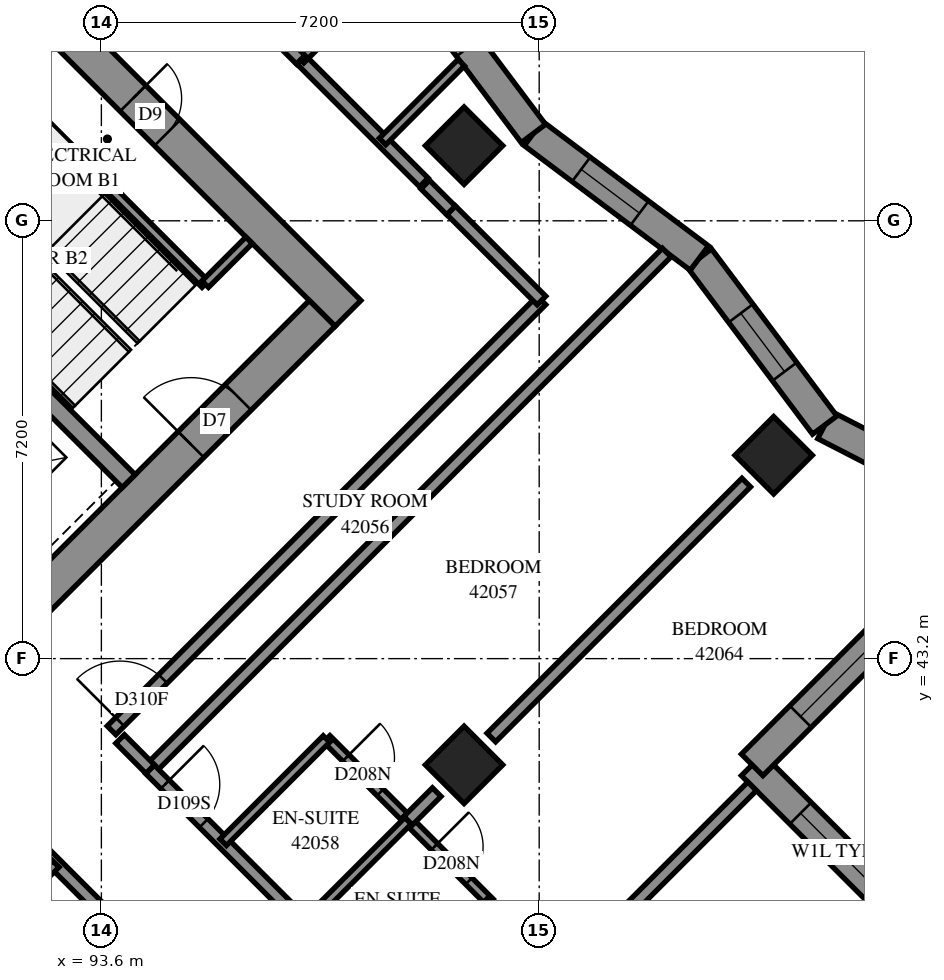
"""IFC4 building model, lengths in metres.
Left out: names, types, materials, properties, quantities, classifications, styles, units other than length and angle.
Written with IfcOpenShell. Run it as: python <this file> out.ifc"""

import sys

from ifc_helpers import new_model, si_unit, direction, frame, frame_2d, origin, origin_2d, place, context, subcontext, project, spatial, polyline, rectangle, outline, extrude, element, fill, save


model = new_model("IFC4")
c1 = context("Model", 3, precision=1e-05, world=origin(), true_north=direction((0.0, 1.0)))
c2 = subcontext(c1, "Body", "Model", "MODEL_VIEW")
j1 = project(units=[si_unit("LENGTHUNIT", "METRE"), si_unit("PLANEANGLEUNIT", "RADIAN")], contexts=[c1])
p1 = place(None, origin())
s1 = spatial("IfcSite", under=j1, at=p1, CompositionType="ELEMENT")
p2 = place(p1, origin())
s2 = spatial("IfcBuilding", under=s1, at=p2, CompositionType="ELEMENT")
p3 = place(p2, frame((0.0, 0.0, 155.8)))
s3 = spatial("IfcBuildingStorey", under=s2, at=p3, CompositionType="ELEMENT", Elevation=155.8)
for number, where, z_axis, x_axis in (
    (1, (99.565, 51.635, 0.0), (0.0, 0.0, 1.0), (0.707, -0.707, 0.0)),
    (2, (104.656, 46.544, 0.0), (0.0, 0.0, 1.0), (0.707, -0.707, 0.0)),
    (3, (99.565, 41.453, 0.0), (0.0, 0.0, 1.0), (0.707, -0.707, 0.0)),
):
    element("IfcColumn", number, at=place(p3, frame(where, z_axis=z_axis, x_axis=x_axis)), inside=s3, PredefinedType="COLUMN", context=c2, shape_type="SweptSolid", body=[
        extrude(rectangle(XDim=0.9, YDim=0.9, at=origin_2d()), origin(), (0.0, 0.0, 1.0), 3.1),
    ])
p4 = place(p3, frame((86.625, 59.908, -0.3), z_axis=(0.0, 0.0, 1.0), x_axis=(0.7071067812, -0.7071067812, 0.0)))
e4 = element("IfcWall", 4, at=p4, inside=s3, PredefinedType="SHEAR", context=c2, shape_type="SweptSolid", body=[
    extrude(rectangle(XDim=15.6, YDim=0.6, at=frame_2d((7.8, 0.0))), origin(), (0.0, 0.0, 1.0), 2.7),
])
p5 = place(p4, frame((10.6, 0.0, 0.3)))
e5 = element("IfcOpeningElement", 5, at=p5, cuts=e4, PredefinedType="OPENING", context=c2, shape_type="SweptSolid", body=[
    extrude(rectangle(XDim=0.8, YDim=2.1, at=frame_2d((0.4, 1.05))), frame((0.0, 0.31, 0.0), z_axis=(0.0, -1.0, 0.0), x_axis=(1.0, 0.0, 0.0)), (0.0, 0.0, 1.0), 0.62),
])
p6 = place(p3, frame((87.049, 38.695, -0.3), z_axis=(0.0, 0.0, 1.0), x_axis=(0.7071067812, 0.7071067812, 0.0)))
e6 = element("IfcWall", 6, at=p6, inside=s3, PredefinedType="SHEAR", context=c2, shape_type="SweptSolid", body=[
    extrude(rectangle(XDim=14.4, YDim=0.6, at=frame_2d((7.2, 0.0))), origin(), (0.0, 0.0, 1.0), 2.7),
])
p7 = place(p6, frame((4.55, 0.0, 0.3)))
e7 = element("IfcOpeningElement", 7, at=p7, cuts=e6, PredefinedType="OPENING", context=c2, shape_type="SweptSolid", body=[
    extrude(rectangle(XDim=1.1, YDim=2.1, at=frame_2d((0.55, 1.05))), frame((0.0, 0.31, 0.0), z_axis=(0.0, -1.0, 0.0), x_axis=(1.0, 0.0, 0.0)), (0.0, 0.0, 1.0), 0.62),
])
p8 = place(p6, frame((11.35, 0.0, 0.3)))
e8 = element("IfcOpeningElement", 8, at=p8, cuts=e6, PredefinedType="OPENING", context=c2, shape_type="SweptSolid", body=[
    extrude(rectangle(XDim=1.1, YDim=2.1, at=frame_2d((0.55, 1.05))), frame((0.0, 0.31, 0.0), z_axis=(0.0, -1.0, 0.0), x_axis=(1.0, 0.0, 0.0)), (0.0, 0.0, 1.0), 0.62),
])
p9 = place(p3, frame((88.958, 51.211, 0.0), z_axis=(0.0, 0.0, 1.0), x_axis=(0.7070998367, -0.7071137256, 0.0)))
e9 = element("IfcWall", 9, at=p9, inside=s3, PredefinedType="SOLIDWALL", context=c2, shape_type="SweptSolid", body=[
    extrude(rectangle(XDim=7.2, YDim=0.3, at=frame_2d((3.6, 0.0))), origin(), (0.0, 0.0, 1.0), 3.1),
])
p10 = place(p3, frame((107.761, 37.994, 0.0), z_axis=(0.0, 0.0, 1.0), x_axis=(-0.7071170022, 0.70709656, 0.0)))
e10 = element("IfcWall", 10, at=p10, inside=s3, PredefinedType="SOLIDWALL", context=c2, shape_type="SweptSolid", body=[
    extrude(outline(polyline([(-0.158, -0.25), (4.642, -0.25), (5.142, 0.25), (0.158, 0.25), (-0.158, -0.25)])), origin(), (0.0, 0.0, 1.0), 3.1),
])
p11 = place(p10, frame((1.967, 0.0, 0.6)))
e11 = element("IfcOpeningElement", 11, at=p11, cuts=e10, PredefinedType="OPENING", context=c2, shape_type="SweptSolid", body=[
    extrude(rectangle(XDim=1.8, YDim=1.9, at=frame_2d((0.9, 0.95))), frame((0.0, 0.26, 0.0), z_axis=(0.0, -1.0, 0.0), x_axis=(1.0, 0.0, 0.0)), (0.0, 0.0, 1.0), 0.52),
])
p12 = place(p3, frame((104.302, 41.453, 0.0), z_axis=(0.0, 0.0, 1.0), x_axis=(0.7071240536, 0.7070895083, 0.0)))
e12 = element("IfcWall", 12, at=p12, inside=s3, PredefinedType="SOLIDWALL", context=c2, shape_type="SweptSolid", body=[
    extrude(outline(polyline([(0.25, -0.25), (6.132, -0.25), (5.447, 0.25), (-0.25, 0.25), (0.25, -0.25)])), origin(), (0.0, 0.0, 1.0), 3.1),
])
p13 = place(p12, frame((1.125, 0.0, 0.6)))
e13 = element("IfcOpeningElement", 13, at=p13, cuts=e12, PredefinedType="OPENING", context=c2, shape_type="SweptSolid", body=[
    extrude(rectangle(XDim=1.8, YDim=1.9, at=frame_2d((0.9, 0.95))), frame((0.0, 0.26, 0.0), z_axis=(0.0, -1.0, 0.0), x_axis=(1.0, 0.0, 0.0)), (0.0, 0.0, 1.0), 0.52),
])
p14 = place(p3, frame((108.396, 45.547, 0.0), z_axis=(0.0, 0.0, 1.0), x_axis=(-0.8890618858, 0.4577870282, 0.0)))
e14 = element("IfcWall", 14, at=p14, inside=s3, PredefinedType="SOLIDWALL", context=c2, shape_type="SweptSolid", body=[
    extrude(outline(polyline([(-0.343, -0.25), (3.205, -0.25), (3.32, 0.25), (0.343, 0.25), (-0.343, -0.25)])), origin(), (0.0, 0.0, 1.0), 3.1),
])
p15 = place(p14, frame((1.203, 0.0, 0.45)))
e15 = element("IfcOpeningElement", 15, at=p15, cuts=e14, PredefinedType="OPENING", context=c2, shape_type="SweptSolid", body=[
    extrude(rectangle(XDim=1.2, YDim=2.5, at=frame_2d((0.6, 1.25))), frame((0.0, 0.26, 0.0), z_axis=(0.0, -1.0, 0.0), x_axis=(1.0, 0.0, 0.0)), (0.0, 0.0, 1.0), 0.52),
])
p16 = place(p3, frame((105.495, 47.04, 0.0), z_axis=(0.0, 0.0, 1.0), x_axis=(-0.600158369, 0.7998811987, 0.0)))
e16 = element("IfcWall", 16, at=p16, inside=s3, PredefinedType="SOLIDWALL", context=c2, shape_type="SweptSolid", body=[
    extrude(outline(polyline([(0.057, -0.25), (3.47, -0.25), (3.399, 0.25), (-0.057, 0.25), (0.057, -0.25)])), origin(), (0.0, 0.0, 1.0), 3.1),
])
p17 = place(p16, frame((1.099, 0.0, 0.45)))
e17 = element("IfcOpeningElement", 17, at=p17, cuts=e16, PredefinedType="OPENING", context=c2, shape_type="SweptSolid", body=[
    extrude(rectangle(XDim=1.2, YDim=2.5, at=frame_2d((0.6, 1.25))), frame((0.0, 0.26, 0.0), z_axis=(0.0, -1.0, 0.0), x_axis=(1.0, 0.0, 0.0)), (0.0, 0.0, 1.0), 0.52),
])
p18 = place(p3, frame((103.434, 49.788, 0.0), z_axis=(0.0, 0.0, 1.0), x_axis=(-0.7998874743, 0.600150005, 0.0)))
e18 = element("IfcWall", 18, at=p18, inside=s3, PredefinedType="SOLIDWALL", context=c2, shape_type="SweptSolid", body=[
    extrude(outline(polyline([(-0.036, -0.25), (3.377, -0.25), (3.449, 0.25), (0.036, 0.25), (-0.036, -0.25)])), origin(), (0.0, 0.0, 1.0), 3.1),
])
p19 = place(p18, frame((1.23, 0.0, 0.45)))
e19 = element("IfcOpeningElement", 19, at=p19, cuts=e18, PredefinedType="OPENING", context=c2, shape_type="SweptSolid", body=[
    extrude(rectangle(XDim=1.2, YDim=2.5, at=frame_2d((0.6, 1.25))), frame((0.0, 0.26, 0.0), z_axis=(0.0, -1.0, 0.0), x_axis=(1.0, 0.0, 0.0)), (0.0, 0.0, 1.0), 0.52),
])
p20 = place(p3, frame((100.704, 51.836, 0.0), z_axis=(0.0, 0.0, 1.0), x_axis=(-0.600150005, 0.7998874743, 0.0)))
e20 = element("IfcWall", 20, at=p20, inside=s3, PredefinedType="SOLIDWALL", context=c2, shape_type="SweptSolid", body=[
    extrude(outline(polyline([(0.036, -0.25), (3.449, -0.25), (3.377, 0.25), (-0.036, 0.25), (0.036, -0.25)])), origin(), (0.0, 0.0, 1.0), 3.1),
])
p21 = place(p20, frame((1.774, 0.0, 0.45)))
e21 = element("IfcOpeningElement", 21, at=p21, cuts=e20, PredefinedType="OPENING", context=c2, shape_type="SweptSolid", body=[
    extrude(rectangle(XDim=1.2, YDim=2.5, at=frame_2d((0.6, 1.25))), frame((0.0, 0.26, 0.0), z_axis=(0.0, -1.0, 0.0), x_axis=(1.0, 0.0, 0.0)), (0.0, 0.0, 1.0), 0.52),
])
p22 = place(p3, frame((91.313, 53.354, 0.0), z_axis=(0.0, 0.0, 1.0), x_axis=(0.7071067812, -0.7071067812, 0.0)))
e22 = element("IfcWall", 22, at=p22, inside=s3, PredefinedType="PARTITIONING", context=c2, shape_type="SweptSolid", body=[
    extrude(rectangle(XDim=5.65, YDim=0.15, at=frame_2d((2.825, 0.0))), origin(), (0.0, 0.0, 1.0), 3.1),
])
p23 = place(p3, frame((95.308, 49.358, 0.0), z_axis=(0.0, 0.0, 1.0), x_axis=(0.70705776, 0.707155799, 0.0)))
e23 = element("IfcWall", 23, at=p23, inside=s3, PredefinedType="PARTITIONING", context=c2, shape_type="SweptSolid", body=[
    extrude(rectangle(XDim=1.02, YDim=0.15, at=frame_2d((0.51, 0.0))), origin(), (0.0, 0.0, 1.0), 3.1),
])
p24 = place(p3, frame((94.401, 41.383, 0.0), z_axis=(0.0, 0.0, 1.0), x_axis=(0.7071067812, 0.7071067812, 0.0)))
e24 = element("IfcWall", 24, at=p24, inside=s3, PredefinedType="PARTITIONING", context=c2, shape_type="SweptSolid", body=[
    extrude(rectangle(XDim=12.014, YDim=0.2, at=frame_2d((6.007, 0.0))), origin(), (0.0, 0.0, 1.0), 3.1),
])
p25 = place(p3, frame((92.209, 40.459, 0.0), z_axis=(0.0, 0.0, 1.0), x_axis=(0.7071067812, -0.7071067812, 0.0)))
e25 = element("IfcWall", 25, at=p25, inside=s3, PredefinedType="PARTITIONING", context=c2, shape_type="SweptSolid", body=[
    extrude(rectangle(XDim=11.698, YDim=0.2, at=frame_2d((5.849, 0.0))), origin(), (0.0, 0.0, 1.0), 3.1),
])
p26 = place(p25, frame((3.047, 0.0, 0.0)))
e26 = element("IfcOpeningElement", 26, at=p26, cuts=e25, PredefinedType="OPENING", context=c2, shape_type="SweptSolid", body=[
    extrude(rectangle(XDim=0.9, YDim=2.1, at=frame_2d((0.45, 1.05))), frame((0.0, 0.11, 0.0), z_axis=(0.0, -1.0, 0.0), x_axis=(1.0, 0.0, 0.0)), (0.0, 0.0, 1.0), 0.22),
])
p27 = place(p25, frame((8.056, 0.0, 0.0)))
e27 = element("IfcOpeningElement", 27, at=p27, cuts=e25, PredefinedType="OPENING", context=c2, shape_type="SweptSolid", body=[
    extrude(rectangle(XDim=1.0, YDim=2.1, at=frame_2d((0.5, 1.05))), frame((0.0, 0.11, 0.0), z_axis=(0.0, -1.0, 0.0), x_axis=(1.0, 0.0, 0.0)), (0.0, 0.0, 1.0), 0.22),
])
p28 = place(p3, frame((93.767, 42.021, 0.0), z_axis=(0.0, 0.0, 1.0), x_axis=(0.7071067812, 0.7071067812, 0.0)))
e28 = element("IfcWall", 28, at=p28, inside=s3, PredefinedType="PARTITIONING", context=c2, shape_type="SweptSolid", body=[
    extrude(rectangle(XDim=9.998, YDim=0.2, at=frame_2d((4.999, 0.0))), origin(), (0.0, 0.0, 1.0), 3.1),
])
p29 = place(p28, frame((0.196, 0.0, 0.0)))
e29 = element("IfcOpeningElement", 29, at=p29, cuts=e28, PredefinedType="OPENING", context=c2, shape_type="SweptSolid", body=[
    extrude(rectangle(XDim=1.0, YDim=2.1, at=frame_2d((0.5, 1.05))), frame((0.0, 0.11, 0.0), z_axis=(0.0, -1.0, 0.0), x_axis=(1.0, 0.0, 0.0)), (0.0, 0.0, 1.0), 0.22),
])
p30 = place(p3, frame((99.494, 36.292, 0.0), z_axis=(0.0, 0.0, 1.0), x_axis=(0.7071067812, 0.7071067812, 0.0)))
e30 = element("IfcWall", 30, at=p30, inside=s3, PredefinedType="PARTITIONING", context=c2, shape_type="SweptSolid", body=[
    extrude(rectangle(XDim=6.799, YDim=0.2, at=frame_2d((3.4, 0.0))), origin(), (0.0, 0.0, 1.0), 3.1),
])
p31 = place(p3, frame((100.013, 41.903, 0.0), z_axis=(0.0, 0.0, 1.0), x_axis=(0.7071067812, 0.7071067812, 0.0)))
e31 = element("IfcWall", 31, at=p31, inside=s3, PredefinedType="PARTITIONING", context=c2, shape_type="SweptSolid", body=[
    extrude(rectangle(XDim=5.928, YDim=0.2, at=frame_2d((2.964, 0.0))), origin(), (0.0, 0.0, 1.0), 3.1),
])
p32 = place(p3, frame((97.305, 41.881, 0.0), z_axis=(0.0, 0.0, 1.0), x_axis=(0.7067382634, -0.707475107, 0.0)))
e32 = element("IfcWall", 32, at=p32, inside=s3, PredefinedType="PARTITIONING", context=c2, shape_type="SweptSolid", body=[
    extrude(rectangle(XDim=3.8, YDim=0.15, at=frame_2d((1.9, 0.0))), origin(), (0.0, 0.0, 1.0), 3.1),
])
p33 = place(p32, frame((0.445, 0.0, 0.0)))
e33 = element("IfcOpeningElement", 33, at=p33, cuts=e32, PredefinedType="OPENING", context=c2, shape_type="SweptSolid", body=[
    extrude(rectangle(XDim=0.8, YDim=2.1, at=frame_2d((0.4, 1.05))), frame((0.0, 0.085, 0.0), z_axis=(0.0, -1.0, 0.0), x_axis=(1.0, 0.0, 0.0)), (0.0, 0.0, 1.0), 0.17),
])
p34 = place(p32, frame((2.507, 0.0, 0.0)))
e34 = element("IfcOpeningElement", 34, at=p34, cuts=e32, PredefinedType="OPENING", context=c2, shape_type="SweptSolid", body=[
    extrude(rectangle(XDim=0.8, YDim=2.1, at=frame_2d((0.4, 1.05))), frame((0.0, 0.085, 0.0), z_axis=(0.0, -1.0, 0.0), x_axis=(1.0, 0.0, 0.0)), (0.0, 0.0, 1.0), 0.17),
])
p35 = place(p3, frame((94.399, 41.379, 0.0), z_axis=(0.0, 0.0, 1.0), x_axis=(0.7071067812, -0.7071067812, 0.0)))
e35 = element("IfcWall", 35, at=p35, inside=s3, PredefinedType="PARTITIONING", context=c2, shape_type="SweptSolid", body=[
    extrude(rectangle(XDim=3.601, YDim=0.2, at=frame_2d((1.8, 0.0))), origin(), (0.0, 0.0, 1.0), 3.1),
])
p36 = place(p35, frame((0.35, 0.0, 0.0)))
e36 = element("IfcOpeningElement", 36, at=p36, cuts=e35, PredefinedType="OPENING", context=c2, shape_type="SweptSolid", body=[
    extrude(rectangle(XDim=0.9, YDim=2.1, at=frame_2d((0.45, 1.05))), frame((0.0, 0.11, 0.0), z_axis=(0.0, -1.0, 0.0), x_axis=(1.0, 0.0, 0.0)), (0.0, 0.0, 1.0), 0.22),
])
p37 = place(p3, frame((96.882, 53.053, 0.0), z_axis=(0.0, 0.0, 1.0), x_axis=(0.7071067812, -0.7071067812, 0.0)))
e37 = element("IfcWall", 37, at=p37, inside=s3, PredefinedType="PARTITIONING", context=c2, shape_type="SweptSolid", body=[
    extrude(rectangle(XDim=2.86, YDim=0.2, at=frame_2d((1.43, 0.0))), origin(), (0.0, 0.0, 1.0), 3.1),
])
for number, where, z_axis, x_axis in (
    (38, (95.603, 40.181, 0.0), (0.0, 0.0, 1.0), (0.707, 0.707, 0.0)),
    (39, (96.947, 38.837, 0.0), (0.0, 0.0, 1.0), (0.707, 0.707, 0.0)),
):
    element("IfcWall", number, at=place(p3, frame(where, z_axis=z_axis, x_axis=x_axis)), inside=s3, PredefinedType="PARTITIONING", context=c2, shape_type="SweptSolid", body=[
        extrude(rectangle(XDim=2.401, YDim=0.15, at=frame_2d((1.201, 0.0))), origin(), (0.0, 0.0, 1.0), 3.1),
    ])
p38 = place(p3, frame((91.152, 38.128, 0.0), z_axis=(0.0, 0.0, 1.0), x_axis=(0.7075233388, 0.706689978, 0.0)))
e40 = element("IfcWall", 40, at=p38, inside=s3, PredefinedType="PARTITIONING", context=c2, shape_type="SweptSolid", body=[
    extrude(rectangle(XDim=2.4, YDim=0.15, at=frame_2d((1.2, 0.0))), origin(), (0.0, 0.0, 1.0), 3.1),
])
p39 = place(p3, frame((98.291, 37.495, 0.0), z_axis=(0.0, 0.0, 1.0), x_axis=(0.7071067812, 0.7071067812, 0.0)))
e41 = element("IfcWall", 41, at=p39, inside=s3, PredefinedType="PARTITIONING", context=c2, shape_type="SweptSolid", body=[
    extrude(rectangle(XDim=2.398, YDim=0.15, at=frame_2d((1.199, 0.0))), origin(), (0.0, 0.0, 1.0), 3.1),
])
p40 = place(p3, frame((99.352, 50.574, 0.0), z_axis=(0.0, 0.0, 1.0), x_axis=(0.7075827869, -0.7066304548, 0.0)))
e42 = element("IfcWall", 42, at=p40, inside=s3, PredefinedType="PARTITIONING", context=c2, shape_type="SweptSolid", body=[
    extrude(rectangle(XDim=2.1, YDim=0.2, at=frame_2d((1.05, 0.0))), origin(), (0.0, 0.0, 1.0), 3.1),
])
p41 = place(p3, frame((96.877, 53.051, 0.0), z_axis=(0.0, 0.0, 1.0), x_axis=(0.707131173, 0.7070823885, 0.0)))
e43 = element("IfcWall", 43, at=p41, inside=s3, PredefinedType="PARTITIONING", context=c2, shape_type="SweptSolid", body=[
    extrude(rectangle(XDim=2.05, YDim=0.15, at=frame_2d((1.025, 0.0))), origin(), (0.0, 0.0, 1.0), 3.1),
])
p42 = place(p41, frame((0.946, 0.0, 0.0)))
e44 = element("IfcOpeningElement", 44, at=p42, cuts=e43, PredefinedType="OPENING", context=c2, shape_type="SweptSolid", body=[
    extrude(rectangle(XDim=0.8, YDim=2.1, at=frame_2d((0.4, 1.05))), frame((0.0, 0.085, 0.0), z_axis=(0.0, -1.0, 0.0), x_axis=(1.0, 0.0, 0.0)), (0.0, 0.0, 1.0), 0.17),
])
p43 = place(p3, frame((98.224, 51.704, 0.0), z_axis=(0.0, 0.0, 1.0), x_axis=(0.7065332413, 0.7076798563, 0.0)))
e45 = element("IfcWall", 45, at=p43, inside=s3, PredefinedType="PARTITIONING", context=c2, shape_type="SweptSolid", body=[
    extrude(rectangle(XDim=1.831, YDim=0.15, at=frame_2d((0.916, 0.0))), origin(), (0.0, 0.0, 1.0), 3.1),
])
p44 = place(p3, frame((93.909, 41.879, 0.0), z_axis=(0.0, 0.0, 1.0), x_axis=(0.7056768426, -0.7085338339, 0.0)))
e46 = element("IfcWall", 46, at=p44, inside=s3, PredefinedType="PARTITIONING", context=c2, shape_type="SweptSolid", body=[
    extrude(rectangle(XDim=0.7, YDim=0.2, at=frame_2d((0.35, 0.0))), origin(), (0.0, 0.0, 1.0), 3.1),
])
p45 = place(p3, frame((98.645, 40.535, 0.0), z_axis=(0.0, 0.0, 1.0), x_axis=(0.7071067812, 0.7071067812, 0.0)))
e47 = element("IfcWall", 47, at=p45, inside=s3, PredefinedType="PARTITIONING", context=c2, shape_type="SweptSolid", body=[
    extrude(rectangle(XDim=0.665, YDim=0.2, at=frame_2d((0.332, 0.0))), origin(), (0.0, 0.0, 1.0), 3.1),
])
p46 = place(p3, frame((98.925, 50.995, 0.0), z_axis=(0.0, 0.0, 1.0), x_axis=(0.7071067812, -0.7071067812, 0.0)))
e48 = element("IfcWall", 48, at=p46, inside=s3, PredefinedType="PARTITIONING", context=c2, shape_type="SweptSolid", body=[
    extrude(rectangle(XDim=0.6, YDim=0.2, at=frame_2d((0.3, 0.0))), origin(), (0.0, 0.0, 1.0), 3.1),
])
p47 = place(p3, frame((96.51, 53.416, 0.0), z_axis=(0.0, 0.0, 1.0), x_axis=(0.7090308706, -0.7051774419, 0.0)))
e49 = element("IfcWall", 49, at=p47, inside=s3, PredefinedType="PARTITIONING", context=c2, shape_type="SweptSolid", body=[
    extrude(rectangle(XDim=0.519, YDim=0.2, at=frame_2d((0.26, 0.0))), origin(), (0.0, 0.0, 1.0), 3.1),
])
p48 = place(p11, origin())
e50 = element("IfcWindow", 50, at=p48, inside=s3, PartitioningType="SINGLE_PANEL", PredefinedType="WINDOW", context=c2, shape_type="SweptSolid", body=[
    extrude(rectangle(XDim=1.8, YDim=1.9, at=frame_2d((0.9, 0.95))), frame((0.0, 0.18, 0.0), z_axis=(0.0, -1.0, 0.0), x_axis=(1.0, 0.0, 0.0)), (0.0, 0.0, 1.0), 0.06),
])
fill(e11, e50)
p49 = place(p13, origin())
e51 = element("IfcWindow", 51, at=p49, inside=s3, PartitioningType="SINGLE_PANEL", PredefinedType="WINDOW", context=c2, shape_type="SweptSolid", body=[
    extrude(rectangle(XDim=1.8, YDim=1.9, at=frame_2d((0.9, 0.95))), frame((0.0, 0.18, 0.0), z_axis=(0.0, -1.0, 0.0), x_axis=(1.0, 0.0, 0.0)), (0.0, 0.0, 1.0), 0.06),
])
fill(e13, e51)
p50 = place(p17, origin())
e52 = element("IfcWindow", 52, at=p50, inside=s3, PartitioningType="SINGLE_PANEL", PredefinedType="WINDOW", context=c2, shape_type="SweptSolid", body=[
    extrude(rectangle(XDim=1.2, YDim=2.5, at=frame_2d((0.6, 1.25))), frame((0.0, 0.18, 0.0), z_axis=(0.0, -1.0, 0.0), x_axis=(1.0, 0.0, 0.0)), (0.0, 0.0, 1.0), 0.06),
])
fill(e17, e52)
p51 = place(p19, origin())
e53 = element("IfcWindow", 53, at=p51, inside=s3, PartitioningType="SINGLE_PANEL", PredefinedType="WINDOW", context=c2, shape_type="SweptSolid", body=[
    extrude(rectangle(XDim=1.2, YDim=2.5, at=frame_2d((0.6, 1.25))), frame((0.0, 0.18, 0.0), z_axis=(0.0, -1.0, 0.0), x_axis=(1.0, 0.0, 0.0)), (0.0, 0.0, 1.0), 0.06),
])
fill(e19, e53)
p52 = place(p21, origin())
e54 = element("IfcWindow", 54, at=p52, inside=s3, PartitioningType="SINGLE_PANEL", PredefinedType="WINDOW", context=c2, shape_type="SweptSolid", body=[
    extrude(rectangle(XDim=1.2, YDim=2.5, at=frame_2d((0.6, 1.25))), frame((0.0, 0.18, 0.0), z_axis=(0.0, -1.0, 0.0), x_axis=(1.0, 0.0, 0.0)), (0.0, 0.0, 1.0), 0.06),
])
fill(e21, e54)
p53 = place(p5, origin())
e55 = element("IfcDoor", 55, at=p53, inside=s3, OperationType="SINGLE_SWING_RIGHT", PredefinedType="DOOR", context=c2, shape_type="SweptSolid", body=[
    extrude(rectangle(XDim=0.8, YDim=2.1, at=frame_2d((0.4, 1.05))), frame((0.0, 0.025, 0.0), z_axis=(0.0, -1.0, 0.0), x_axis=(1.0, 0.0, 0.0)), (0.0, 0.0, 1.0), 0.05),
])
fill(e5, e55)
p54 = place(p8, origin())
e56 = element("IfcDoor", 56, at=p54, inside=s3, OperationType="SINGLE_SWING_RIGHT", PredefinedType="DOOR", context=c2, shape_type="SweptSolid", body=[
    extrude(rectangle(XDim=1.1, YDim=2.1, at=frame_2d((0.55, 1.05))), frame((0.0, 0.025, 0.0), z_axis=(0.0, -1.0, 0.0), x_axis=(1.0, 0.0, 0.0)), (0.0, 0.0, 1.0), 0.05),
])
fill(e8, e56)
p55 = place(p29, origin())
e57 = element("IfcDoor", 57, at=p55, inside=s3, OperationType="SINGLE_SWING_LEFT", PredefinedType="DOOR", context=c2, shape_type="SweptSolid", body=[
    extrude(rectangle(XDim=1.0, YDim=2.1, at=frame_2d((0.5, 1.05))), frame((0.0, 0.025, 0.0), z_axis=(0.0, -1.0, 0.0), x_axis=(1.0, 0.0, 0.0)), (0.0, 0.0, 1.0), 0.05),
])
fill(e29, e57)
p56 = place(p36, origin())
e58 = element("IfcDoor", 58, at=p56, inside=s3, OperationType="SINGLE_SWING_RIGHT", PredefinedType="DOOR", context=c2, shape_type="SweptSolid", body=[
    extrude(rectangle(XDim=0.9, YDim=2.1, at=frame_2d((0.45, 1.05))), frame((0.0, 0.025, 0.0), z_axis=(0.0, -1.0, 0.0), x_axis=(1.0, 0.0, 0.0)), (0.0, 0.0, 1.0), 0.05),
])
fill(e36, e58)
p57 = place(p33, origin())
e59 = element("IfcDoor", 59, at=p57, inside=s3, OperationType="SINGLE_SWING_RIGHT", PredefinedType="DOOR", context=c2, shape_type="SweptSolid", body=[
    extrude(rectangle(XDim=0.8, YDim=2.1, at=frame_2d((0.4, 1.05))), frame((0.0, 0.025, 0.0), z_axis=(0.0, -1.0, 0.0), x_axis=(1.0, 0.0, 0.0)), (0.0, 0.0, 1.0), 0.05),
])
fill(e33, e59)
p58 = place(p34, origin())
e60 = element("IfcDoor", 60, at=p58, inside=s3, OperationType="SINGLE_SWING_RIGHT", PredefinedType="DOOR", context=c2, shape_type="SweptSolid", body=[
    extrude(rectangle(XDim=0.8, YDim=2.1, at=frame_2d((0.4, 1.05))), frame((0.0, 0.025, 0.0), z_axis=(0.0, -1.0, 0.0), x_axis=(1.0, 0.0, 0.0)), (0.0, 0.0, 1.0), 0.05),
])
fill(e34, e60)
save(model, sys.argv[1])
